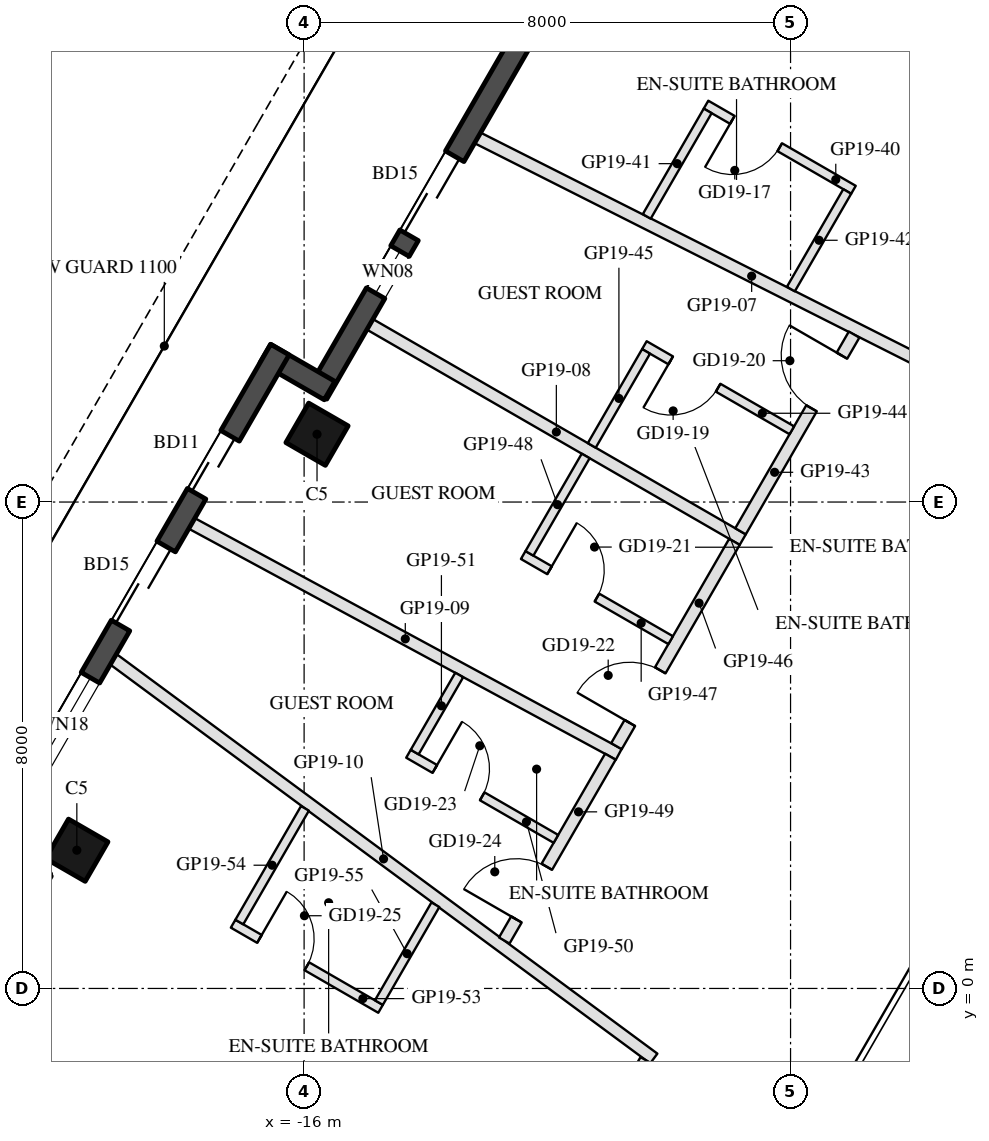
"""IFC4 building model, lengths in metres.
Left out: names, types, materials, properties, quantities, classifications, styles, units other than length and angle.
Written with IfcOpenShell. Run it as: python <this file> out.ifc"""

import sys

from ifc_helpers import new_model, si_unit, direction, frame, frame_2d, origin, origin_2d, place, context, subcontext, project, spatial, rectangle, hollow_rectangle, extrude, element, fill, save


model = new_model("IFC4")
c1 = context("Model", 3, precision=1e-05, world=origin(), true_north=direction((0.0, 1.0)))
c2 = subcontext(c1, "Body", "Model", "MODEL_VIEW")
j1 = project(units=[si_unit("LENGTHUNIT", "METRE"), si_unit("PLANEANGLEUNIT", "RADIAN")], contexts=[c1])
p1 = place(None, origin())
s1 = spatial("IfcSite", under=j1, at=p1, CompositionType="ELEMENT")
p2 = place(p1, origin())
s2 = spatial("IfcBuilding", under=s1, at=p2, CompositionType="ELEMENT")
p3 = place(p2, frame((0.0, 0.0, 205.8)))
s3 = spatial("IfcBuildingStorey", under=s2, at=p3, CompositionType="ELEMENT", Elevation=205.8)
for number, where, z_axis, x_axis in (
    (1, (-15.788, 9.115, 0.0), (0.0, 0.0, 1.0), (0.5, 0.866, 0.0)),
    (2, (-19.738, 2.273, 0.0), (0.0, 0.0, 1.0), (0.5, 0.866, 0.0)),
):
    element("IfcColumn", number, at=place(p3, frame(where, z_axis=z_axis, x_axis=x_axis)), inside=s3, PredefinedType="COLUMN", context=c2, shape_type="SweptSolid", body=[
        extrude(hollow_rectangle(XDim=0.75, YDim=0.75, WallThickness=0.035, at=origin_2d()), origin(), (0.0, 0.0, 1.0), 3.7),
    ])
p4 = place(p3, frame((-13.413, 16.029, 0.0), z_axis=(0.0, 0.0, 1.0), x_axis=(0.866005645448, -0.500034220881, 0.0)))
e3 = element("IfcWall", 3, at=p4, inside=s3, PredefinedType="SOLIDWALL", context=c2, shape_type="SweptSolid", body=[
    extrude(rectangle(XDim=1.22, YDim=0.35, at=frame_2d((0.61, 0.0))), origin(), (0.0, 0.0, 1.0), 3.55),
])
p5 = place(p3, frame((-12.409, 15.617, 0.0), z_axis=(0.0, 0.0, 1.0), x_axis=(-0.500003597184, -0.866023326939, 0.0)))
e4 = element("IfcWall", 4, at=p5, inside=s3, PredefinedType="SOLIDWALL", context=c2, shape_type="SweptSolid", body=[
    extrude(rectangle(XDim=6.74, YDim=0.35, at=frame_2d((3.37, 0.0))), origin(), (0.0, 0.0, 1.0), 3.55),
])
p6 = place(p5, frame((2.229, 0.0, 0.0)))
e5 = element("IfcOpeningElement", 5, at=p6, cuts=e4, PredefinedType="OPENING", context=c2, shape_type="SweptSolid", body=[
    extrude(rectangle(XDim=1.5, YDim=2.4, at=frame_2d((0.75, 1.2))), frame((0.0, 0.185, 0.0), z_axis=(0.0, -1.0, 0.0), x_axis=(1.0, 0.0, 0.0)), (0.0, 0.0, 1.0), 0.37),
])
p7 = place(p5, frame((4.029, 0.0, 0.3)))
e6 = element("IfcOpeningElement", 6, at=p7, cuts=e4, PredefinedType="OPENING", context=c2, shape_type="SweptSolid", body=[
    extrude(rectangle(XDim=0.8, YDim=2.65, at=frame_2d((0.4, 1.325))), frame((0.0, 0.185, 0.0), z_axis=(0.0, -1.0, 0.0), x_axis=(1.0, 0.0, 0.0)), (0.0, 0.0, 1.0), 0.37),
])
p8 = place(p3, frame((-15.581, 9.833, 0.0), z_axis=(0.0, 0.0, 1.0), x_axis=(-0.866055662726, 0.499947586314, 0.0)))
e7 = element("IfcWall", 7, at=p8, inside=s3, PredefinedType="SOLIDWALL", context=c2, shape_type="SweptSolid", body=[
    extrude(rectangle(XDim=1.22, YDim=0.35, at=frame_2d((0.61, 0.0))), origin(), (0.0, 0.0, 1.0), 3.55),
])
p9 = place(p3, frame((-16.398, 10.507, 0.0), z_axis=(0.0, 0.0, 1.0), x_axis=(-0.499999142773, -0.866025898704, 0.0)))
e8 = element("IfcWall", 8, at=p9, inside=s3, PredefinedType="SOLIDWALL", context=c2, shape_type="SweptSolid", body=[
    extrude(rectangle(XDim=9.7, YDim=0.35, at=frame_2d((4.85, 0.0))), origin(), (0.0, 0.0, 1.0), 3.55),
])
p10 = place(p9, frame((1.638, 0.0, 0.0)))
e9 = element("IfcOpeningElement", 9, at=p10, cuts=e8, PredefinedType="OPENING", context=c2, shape_type="SweptSolid", body=[
    extrude(rectangle(XDim=1.1, YDim=2.4, at=frame_2d((0.55, 1.2))), frame((0.0, 0.185, 0.0), z_axis=(0.0, -1.0, 0.0), x_axis=(1.0, 0.0, 0.0)), (0.0, 0.0, 1.0), 0.37),
])
p11 = place(p9, frame((3.74, 0.0, 0.0)))
e10 = element("IfcOpeningElement", 10, at=p11, cuts=e8, PredefinedType="OPENING", context=c2, shape_type="SweptSolid", body=[
    extrude(rectangle(XDim=1.5, YDim=2.4, at=frame_2d((0.75, 1.2))), frame((0.0, 0.185, 0.0), z_axis=(0.0, -1.0, 0.0), x_axis=(1.0, 0.0, 0.0)), (0.0, 0.0, 1.0), 0.37),
])
p12 = place(p9, frame((6.231, 0.0, 0.3)))
e11 = element("IfcOpeningElement", 11, at=p12, cuts=e8, PredefinedType="OPENING", context=c2, shape_type="SweptSolid", body=[
    extrude(rectangle(XDim=1.8, YDim=2.65, at=frame_2d((0.9, 1.325))), frame((0.0, 0.185, 0.0), z_axis=(0.0, -1.0, 0.0), x_axis=(1.0, 0.0, 0.0)), (0.0, 0.0, 1.0), 0.37),
])
p13 = place(p3, frame((-13.147, 13.989, 0.0), z_axis=(0.0, 0.0, 1.0), x_axis=(0.892898572595, -0.450257858408, 0.0)))
e12 = element("IfcWall", 12, at=p13, inside=s3, PredefinedType="PARTITIONING", context=c2, shape_type="SweptSolid", body=[
    extrude(rectangle(XDim=10.096, YDim=0.2, at=frame_2d((5.048, 0.0))), origin(), (0.0, 0.0, 1.0), 3.06),
])
p14 = place(p3, frame((-14.917, 10.922, 0.0), z_axis=(0.0, 0.0, 1.0), x_axis=(0.866019052629, -0.500011000363, 0.0)))
e13 = element("IfcWall", 13, at=p14, inside=s3, PredefinedType="PARTITIONING", context=c2, shape_type="SweptSolid", body=[
    extrude(rectangle(XDim=7.08, YDim=0.2, at=frame_2d((3.54, 0.0))), origin(), (0.0, 0.0, 1.0), 3.06),
])
p15 = place(p3, frame((-17.847, 7.648, 0.0), z_axis=(0.0, 0.0, 1.0), x_axis=(0.879604495132, -0.475705720109, 0.0)))
e14 = element("IfcWall", 14, at=p15, inside=s3, PredefinedType="PARTITIONING", context=c2, shape_type="SweptSolid", body=[
    extrude(rectangle(XDim=7.983, YDim=0.2, at=frame_2d((3.992, 0.0))), origin(), (0.0, 0.0, 1.0), 3.06),
])
p16 = place(p3, frame((-19.137, 5.414, 0.0), z_axis=(0.0, 0.0, 1.0), x_axis=(0.804306065669, -0.594215241077, 0.0)))
e15 = element("IfcWall", 15, at=p16, inside=s3, PredefinedType="PARTITIONING", context=c2, shape_type="SweptSolid", body=[
    extrude(rectangle(XDim=11.05, YDim=0.2, at=frame_2d((5.525, 0.0))), origin(), (0.0, 0.0, 1.0), 3.06),
])
p17 = place(p3, frame((-6.965, 13.136, 0.0), z_axis=(0.0, 0.0, 1.0), x_axis=(-0.866034573852, 0.49998411664, 0.0)))
e16 = element("IfcWall", 16, at=p17, inside=s3, PredefinedType="PARTITIONING", context=c2, shape_type="SweptSolid", body=[
    extrude(rectangle(XDim=2.8, YDim=0.15, at=frame_2d((1.4, 0.0))), origin(), (0.0, 0.0, 1.0), 2.95),
])
p18 = place(p17, frame((1.4, 0.0, 0.0)))
e17 = element("IfcOpeningElement", 17, at=p18, cuts=e16, PredefinedType="OPENING", context=c2, shape_type="SweptSolid", body=[
    extrude(rectangle(XDim=0.9, YDim=2.1, at=frame_2d((0.45, 1.05))), frame((0.0, 0.085, 0.0), z_axis=(0.0, -1.0, 0.0), x_axis=(1.0, 0.0, 0.0)), (0.0, 0.0, 1.0), 0.17),
])
p19 = place(p3, frame((-9.363, 14.433, 0.0), z_axis=(0.0, 0.0, 1.0), x_axis=(-0.500056363668, -0.86599285976, 0.0)))
e18 = element("IfcWall", 18, at=p19, inside=s3, PredefinedType="PARTITIONING", context=c2, shape_type="SweptSolid", body=[
    extrude(rectangle(XDim=2.004, YDim=0.15, at=frame_2d((1.002, 0.0))), origin(), (0.0, 0.0, 1.0), 2.95),
])
p20 = place(p3, frame((-7.068, 13.108, 0.0), z_axis=(0.0, 0.0, 1.0), x_axis=(-0.4999770169, -0.866038672677, 0.0)))
e19 = element("IfcWall", 19, at=p20, inside=s3, PredefinedType="PARTITIONING", context=c2, shape_type="SweptSolid", body=[
    extrude(rectangle(XDim=1.854, YDim=0.15, at=frame_2d((0.927, 0.0))), origin(), (0.0, 0.0, 1.0), 2.95),
])
p21 = place(p3, frame((-8.823, 7.519, 0.0), z_axis=(0.0, 0.0, 1.0), x_axis=(0.500026055714, 0.866010359988, 0.0)))
e20 = element("IfcWall", 20, at=p21, inside=s3, PredefinedType="PARTITIONING", context=c2, shape_type="SweptSolid", body=[
    extrude(rectangle(XDim=3.736, YDim=0.2, at=frame_2d((1.868, 0.0))), origin(), (0.0, 0.0, 1.0), 2.95),
])
p22 = place(p21, frame((2.336, 0.0, 0.0)))
e21 = element("IfcOpeningElement", 21, at=p22, cuts=e20, PredefinedType="OPENING", context=c2, shape_type="SweptSolid", body=[
    extrude(rectangle(XDim=1.0, YDim=2.1, at=frame_2d((0.5, 1.05))), frame((0.0, 0.11, 0.0), z_axis=(0.0, -1.0, 0.0), x_axis=(1.0, 0.0, 0.0)), (0.0, 0.0, 1.0), 0.22),
])
p23 = place(p3, frame((-7.979, 9.18, 0.0), z_axis=(0.0, 0.0, 1.0), x_axis=(-0.866034573852, 0.49998411664, 0.0)))
e22 = element("IfcWall", 22, at=p23, inside=s3, PredefinedType="PARTITIONING", context=c2, shape_type="SweptSolid", body=[
    extrude(rectangle(XDim=2.8, YDim=0.15, at=frame_2d((1.4, 0.0))), origin(), (0.0, 0.0, 1.0), 2.95),
])
p24 = place(p23, frame((1.4, 0.0, 0.0)))
e23 = element("IfcOpeningElement", 23, at=p24, cuts=e22, PredefinedType="OPENING", context=c2, shape_type="SweptSolid", body=[
    extrude(rectangle(XDim=0.9, YDim=2.1, at=frame_2d((0.45, 1.05))), frame((0.0, 0.085, 0.0), z_axis=(0.0, -1.0, 0.0), x_axis=(1.0, 0.0, 0.0)), (0.0, 0.0, 1.0), 0.17),
])
p25 = place(p3, frame((-10.376, 10.478, 0.0), z_axis=(0.0, 0.0, 1.0), x_axis=(-0.500109033781, -0.865962443949, 0.0)))
e24 = element("IfcWall", 24, at=p25, inside=s3, PredefinedType="PARTITIONING", context=c2, shape_type="SweptSolid", body=[
    extrude(rectangle(XDim=1.786, YDim=0.15, at=frame_2d((0.893, 0.0))), origin(), (0.0, 0.0, 1.0), 2.95),
])
p26 = place(p3, frame((-10.863, 3.985, 0.0), z_axis=(0.0, 0.0, 1.0), x_axis=(0.500009256921, 0.866020059232, 0.0)))
e25 = element("IfcWall", 25, at=p26, inside=s3, PredefinedType="PARTITIONING", context=c2, shape_type="SweptSolid", body=[
    extrude(rectangle(XDim=3.881, YDim=0.2, at=frame_2d((1.94, 0.0))), origin(), (0.0, 0.0, 1.0), 2.95),
])
p27 = place(p26, frame((0.44, 0.0, 0.0)))
e26 = element("IfcOpeningElement", 26, at=p27, cuts=e25, PredefinedType="OPENING", context=c2, shape_type="SweptSolid", body=[
    extrude(rectangle(XDim=1.0, YDim=2.1, at=frame_2d((0.5, 1.05))), frame((0.0, 0.11, 0.0), z_axis=(0.0, -1.0, 0.0), x_axis=(1.0, 0.0, 0.0)), (0.0, 0.0, 1.0), 0.22),
])
p28 = place(p3, frame((-12.397, 7.128, 0.0), z_axis=(0.0, 0.0, 1.0), x_axis=(0.866018616679, -0.500011755427, 0.0)))
e27 = element("IfcWall", 27, at=p28, inside=s3, PredefinedType="PARTITIONING", context=c2, shape_type="SweptSolid", body=[
    extrude(rectangle(XDim=2.8, YDim=0.15, at=frame_2d((1.4, 0.0))), origin(), (0.0, 0.0, 1.0), 2.95),
])
p29 = place(p28, frame((0.5, 0.0, 0.0)))
e28 = element("IfcOpeningElement", 28, at=p29, cuts=e27, PredefinedType="OPENING", context=c2, shape_type="SweptSolid", body=[
    extrude(rectangle(XDim=0.9, YDim=2.1, at=frame_2d((0.45, 1.05))), frame((0.0, 0.085, 0.0), z_axis=(0.0, -1.0, 0.0), x_axis=(1.0, 0.0, 0.0)), (0.0, 0.0, 1.0), 0.17),
])
p30 = place(p3, frame((-11.369, 8.758, 0.0), z_axis=(0.0, 0.0, 1.0), x_axis=(-0.500042316284, -0.866000971088, 0.0)))
e29 = element("IfcWall", 29, at=p30, inside=s3, PredefinedType="PARTITIONING", context=c2, shape_type="SweptSolid", body=[
    extrude(rectangle(XDim=1.85, YDim=0.15, at=frame_2d((0.925, 0.0))), origin(), (0.0, 0.0, 1.0), 2.95),
])
p31 = place(p3, frame((-12.708, 0.789, 0.0), z_axis=(0.0, 0.0, 1.0), x_axis=(0.49999088835, 0.866030664334, 0.0)))
e30 = element("IfcWall", 30, at=p31, inside=s3, PredefinedType="PARTITIONING", context=c2, shape_type="SweptSolid", body=[
    extrude(rectangle(XDim=3.49, YDim=0.2, at=frame_2d((1.745, 0.0))), origin(), (0.0, 0.0, 1.0), 2.95),
])
p32 = place(p31, frame((0.4, 0.0, 0.0)))
e31 = element("IfcOpeningElement", 31, at=p32, cuts=e30, PredefinedType="OPENING", context=c2, shape_type="SweptSolid", body=[
    extrude(rectangle(XDim=1.0, YDim=2.1, at=frame_2d((0.5, 1.05))), frame((0.0, 0.11, 0.0), z_axis=(0.0, -1.0, 0.0), x_axis=(1.0, 0.0, 0.0)), (0.0, 0.0, 1.0), 0.22),
])
p33 = place(p3, frame((-14.284, 3.86, 0.0), z_axis=(0.0, 0.0, 1.0), x_axis=(0.865996816683, -0.500049511043, 0.0)))
e32 = element("IfcWall", 32, at=p33, inside=s3, PredefinedType="PARTITIONING", context=c2, shape_type="SweptSolid", body=[
    extrude(rectangle(XDim=2.8, YDim=0.15, at=frame_2d((1.4, 0.0))), origin(), (0.0, 0.0, 1.0), 2.95),
])
p34 = place(p33, frame((0.5, 0.0, 0.0)))
e33 = element("IfcOpeningElement", 33, at=p34, cuts=e32, PredefinedType="OPENING", context=c2, shape_type="SweptSolid", body=[
    extrude(rectangle(XDim=0.9, YDim=2.1, at=frame_2d((0.45, 1.05))), frame((0.0, 0.085, 0.0), z_axis=(0.0, -1.0, 0.0), x_axis=(1.0, 0.0, 0.0)), (0.0, 0.0, 1.0), 0.17),
])
p35 = place(p3, frame((-13.449, 5.156, 0.0), z_axis=(0.0, 0.0, 1.0), x_axis=(-0.499958157915, -0.866049559976, 0.0)))
e34 = element("IfcWall", 34, at=p35, inside=s3, PredefinedType="PARTITIONING", context=c2, shape_type="SweptSolid", body=[
    extrude(rectangle(XDim=1.465, YDim=0.15, at=frame_2d((0.732, 0.0))), origin(), (0.0, 0.0, 1.0), 3.55),
])
p36 = place(p3, frame((-12.269, -4.45, 0.0), z_axis=(0.0, 0.0, 1.0), x_axis=(0.500019063067, 0.866014397438, 0.0)))
e35 = element("IfcWall", 35, at=p36, inside=s3, PredefinedType="PARTITIONING", context=c2, shape_type="SweptSolid", body=[
    extrude(rectangle(XDim=3.776, YDim=0.2, at=frame_2d((1.888, 0.0))), origin(), (0.0, 0.0, 1.0), 2.95),
])
p37 = place(p36, frame((1.388, 0.0, 0.0)))
e36 = element("IfcOpeningElement", 36, at=p37, cuts=e35, PredefinedType="OPENING", context=c2, shape_type="SweptSolid", body=[
    extrude(rectangle(XDim=1.0, YDim=2.1, at=frame_2d((0.5, 1.05))), frame((0.0, 0.11, 0.0), z_axis=(0.0, -1.0, 0.0), x_axis=(1.0, 0.0, 0.0)), (0.0, 0.0, 1.0), 0.22),
])
p38 = place(p3, frame((-17.167, 1.065, 0.0), z_axis=(0.0, 0.0, 1.0), x_axis=(0.866034573852, -0.49998411664, 0.0)))
e37 = element("IfcWall", 37, at=p38, inside=s3, PredefinedType="PARTITIONING", context=c2, shape_type="SweptSolid", body=[
    extrude(rectangle(XDim=2.8, YDim=0.15, at=frame_2d((1.4, 0.0))), origin(), (0.0, 0.0, 1.0), 3.55),
])
p39 = place(p38, frame((0.5, 0.0, 0.0)))
e38 = element("IfcOpeningElement", 38, at=p39, cuts=e37, PredefinedType="OPENING", context=c2, shape_type="SweptSolid", body=[
    extrude(rectangle(XDim=0.9, YDim=2.1, at=frame_2d((0.45, 1.05))), frame((0.0, 0.085, 0.0), z_axis=(0.0, -1.0, 0.0), x_axis=(1.0, 0.0, 0.0)), (0.0, 0.0, 1.0), 0.17),
])
p40 = place(p3, frame((-15.986, 2.961, 0.0), z_axis=(0.0, 0.0, 1.0), x_axis=(-0.499983569942, -0.866034889475, 0.0)))
e39 = element("IfcWall", 39, at=p40, inside=s3, PredefinedType="PARTITIONING", context=c2, shape_type="SweptSolid", body=[
    extrude(rectangle(XDim=2.158, YDim=0.15, at=frame_2d((1.079, 0.0))), origin(), (0.0, 0.0, 1.0), 3.55),
])
p41 = place(p3, frame((-13.841, 1.377, 0.0), z_axis=(0.0, 0.0, 1.0), x_axis=(-0.500109064886, -0.865962425986, 0.0)))
e40 = element("IfcWall", 40, at=p41, inside=s3, PredefinedType="PARTITIONING", context=c2, shape_type="SweptSolid", body=[
    extrude(rectangle(XDim=1.858, YDim=0.15, at=frame_2d((0.929, 0.0))), origin(), (0.0, 0.0, 1.0), 3.55),
])
p42 = place(p6, frame((1.5, 0.0, 0.0), z_axis=(0.0, 0.0, 1.0), x_axis=(-1.0, 0.0, 0.0)))
e41 = element("IfcDoor", 41, at=p42, inside=s3, OperationType="SLIDING_TO_LEFT", PredefinedType="DOOR", context=c2, shape_type="SweptSolid", body=[
    extrude(rectangle(XDim=1.5, YDim=2.4, at=frame_2d((0.75, 1.2))), frame((0.0, 0.025, 0.0), z_axis=(0.0, -1.0, 0.0), x_axis=(1.0, 0.0, 0.0)), (0.0, 0.0, 1.0), 0.05),
])
fill(e5, e41)
p43 = place(p7, origin())
e42 = element("IfcWindow", 42, at=p43, inside=s3, PartitioningType="SINGLE_PANEL", PredefinedType="WINDOW", context=c2, shape_type="SweptSolid", body=[
    extrude(rectangle(XDim=0.8, YDim=2.65, at=frame_2d((0.4, 1.325))), frame((0.0, 0.03, 0.0), z_axis=(0.0, -1.0, 0.0), x_axis=(1.0, 0.0, 0.0)), (0.0, 0.0, 1.0), 0.06),
])
fill(e6, e42)
p44 = place(p10, frame((1.1, 0.0, 0.0), z_axis=(0.0, 0.0, 1.0), x_axis=(-1.0, 0.0, 0.0)))
e43 = element("IfcDoor", 43, at=p44, inside=s3, OperationType="SLIDING_TO_LEFT", PredefinedType="DOOR", context=c2, shape_type="SweptSolid", body=[
    extrude(rectangle(XDim=1.1, YDim=2.4, at=frame_2d((0.55, 1.2))), frame((0.0, 0.025, 0.0), z_axis=(0.0, -1.0, 0.0), x_axis=(1.0, 0.0, 0.0)), (0.0, 0.0, 1.0), 0.05),
])
fill(e9, e43)
p45 = place(p11, frame((1.5, 0.0, 0.0), z_axis=(0.0, 0.0, 1.0), x_axis=(-1.0, 0.0, 0.0)))
e44 = element("IfcDoor", 44, at=p45, inside=s3, OperationType="SLIDING_TO_LEFT", PredefinedType="DOOR", context=c2, shape_type="SweptSolid", body=[
    extrude(rectangle(XDim=1.5, YDim=2.4, at=frame_2d((0.75, 1.2))), frame((0.0, 0.025, 0.0), z_axis=(0.0, -1.0, 0.0), x_axis=(1.0, 0.0, 0.0)), (0.0, 0.0, 1.0), 0.05),
])
fill(e10, e44)
p46 = place(p12, origin())
e45 = element("IfcWindow", 45, at=p46, inside=s3, PartitioningType="SINGLE_PANEL", PredefinedType="WINDOW", context=c2, shape_type="SweptSolid", body=[
    extrude(rectangle(XDim=1.8, YDim=2.65, at=frame_2d((0.9, 1.325))), frame((0.0, 0.03, 0.0), z_axis=(0.0, -1.0, 0.0), x_axis=(1.0, 0.0, 0.0)), (0.0, 0.0, 1.0), 0.06),
])
fill(e11, e45)
p47 = place(p18, origin())
e46 = element("IfcDoor", 46, at=p47, inside=s3, OperationType="SINGLE_SWING_RIGHT", PredefinedType="DOOR", context=c2, shape_type="SweptSolid", body=[
    extrude(rectangle(XDim=0.9, YDim=2.1, at=frame_2d((0.45, 1.05))), frame((0.0, 0.025, 0.0), z_axis=(0.0, -1.0, 0.0), x_axis=(1.0, 0.0, 0.0)), (0.0, 0.0, 1.0), 0.05),
])
fill(e17, e46)
p48 = place(p24, origin())
e47 = element("IfcDoor", 47, at=p48, inside=s3, OperationType="SINGLE_SWING_RIGHT", PredefinedType="DOOR", context=c2, shape_type="SweptSolid", body=[
    extrude(rectangle(XDim=0.9, YDim=2.1, at=frame_2d((0.45, 1.05))), frame((0.0, 0.025, 0.0), z_axis=(0.0, -1.0, 0.0), x_axis=(1.0, 0.0, 0.0)), (0.0, 0.0, 1.0), 0.05),
])
fill(e23, e47)
p49 = place(p22, origin())
e48 = element("IfcDoor", 48, at=p49, inside=s3, OperationType="SINGLE_SWING_RIGHT", PredefinedType="DOOR", context=c2, shape_type="SweptSolid", body=[
    extrude(rectangle(XDim=1.0, YDim=2.1, at=frame_2d((0.5, 1.05))), frame((0.0, 0.025, 0.0), z_axis=(0.0, -1.0, 0.0), x_axis=(1.0, 0.0, 0.0)), (0.0, 0.0, 1.0), 0.05),
])
fill(e21, e48)
p50 = place(p29, origin())
e49 = element("IfcDoor", 49, at=p50, inside=s3, OperationType="SINGLE_SWING_LEFT", PredefinedType="DOOR", context=c2, shape_type="SweptSolid", body=[
    extrude(rectangle(XDim=0.9, YDim=2.1, at=frame_2d((0.45, 1.05))), frame((0.0, 0.025, 0.0), z_axis=(0.0, -1.0, 0.0), x_axis=(1.0, 0.0, 0.0)), (0.0, 0.0, 1.0), 0.05),
])
fill(e28, e49)
p51 = place(p27, origin())
e50 = element("IfcDoor", 50, at=p51, inside=s3, OperationType="SINGLE_SWING_LEFT", PredefinedType="DOOR", context=c2, shape_type="SweptSolid", body=[
    extrude(rectangle(XDim=1.0, YDim=2.1, at=frame_2d((0.5, 1.05))), frame((0.0, 0.025, 0.0), z_axis=(0.0, -1.0, 0.0), x_axis=(1.0, 0.0, 0.0)), (0.0, 0.0, 1.0), 0.05),
])
fill(e26, e50)
p52 = place(p34, origin())
e51 = element("IfcDoor", 51, at=p52, inside=s3, OperationType="SINGLE_SWING_LEFT", PredefinedType="DOOR", context=c2, shape_type="SweptSolid", body=[
    extrude(rectangle(XDim=0.9, YDim=2.1, at=frame_2d((0.45, 1.05))), frame((0.0, 0.025, 0.0), z_axis=(0.0, -1.0, 0.0), x_axis=(1.0, 0.0, 0.0)), (0.0, 0.0, 1.0), 0.05),
])
fill(e33, e51)
p53 = place(p32, origin())
e52 = element("IfcDoor", 52, at=p53, inside=s3, OperationType="SINGLE_SWING_LEFT", PredefinedType="DOOR", context=c2, shape_type="SweptSolid", body=[
    extrude(rectangle(XDim=1.0, YDim=2.1, at=frame_2d((0.5, 1.05))), frame((0.0, 0.025, 0.0), z_axis=(0.0, -1.0, 0.0), x_axis=(1.0, 0.0, 0.0)), (0.0, 0.0, 1.0), 0.05),
])
fill(e31, e52)
p54 = place(p39, origin())
e53 = element("IfcDoor", 53, at=p54, inside=s3, OperationType="SINGLE_SWING_LEFT", PredefinedType="DOOR", context=c2, shape_type="SweptSolid", body=[
    extrude(rectangle(XDim=0.9, YDim=2.1, at=frame_2d((0.45, 1.05))), frame((0.0, 0.025, 0.0), z_axis=(0.0, -1.0, 0.0), x_axis=(1.0, 0.0, 0.0)), (0.0, 0.0, 1.0), 0.05),
])
fill(e38, e53)
save(model, sys.argv[1])
